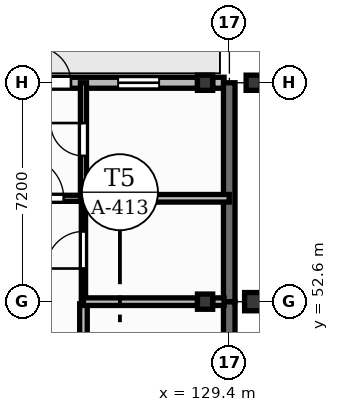
"""IFC4 building model, lengths in metres.
Left out: names, types, materials, properties, quantities, classifications, styles, units other than length and angle.
Written with IfcOpenShell. Run it as: python <this file> out.ifc"""

import sys

from ifc_helpers import new_model, si_unit, direction, frame, frame_2d, origin, origin_2d, place, context, subcontext, project, spatial, rectangle, extrude, element, fill, save


model = new_model("IFC4")
c1 = context("Model", 3, precision=1e-05, world=origin(), true_north=direction((0.0, 1.0)))
c2 = subcontext(c1, "Body", "Model", "MODEL_VIEW")
j1 = project(units=[si_unit("LENGTHUNIT", "METRE"), si_unit("PLANEANGLEUNIT", "RADIAN")], contexts=[c1])
p1 = place(None, origin())
s1 = spatial("IfcSite", under=j1, at=p1, CompositionType="ELEMENT")
p2 = place(p1, origin())
s2 = spatial("IfcBuilding", under=s1, at=p2, CompositionType="ELEMENT")
p3 = place(p2, origin())
s3 = spatial("IfcBuildingStorey", under=s2, at=p3, CompositionType="ELEMENT", Elevation=0.0)
for number, where, z_axis, x_axis in (
    (1, (128.6, 52.6, 0.0), (0.0, 0.0, 1.0), (1.0, 0.0, 0.0)),
    (2, (128.6, 59.8, 0.0), (0.0, 0.0, 1.0), (1.0, 0.0, 0.0)),
):
    element("IfcColumn", number, at=place(p3, frame(where, z_axis=z_axis, x_axis=x_axis)), inside=s3, PredefinedType="COLUMN", context=c2, shape_type="SweptSolid", body=[
        extrude(rectangle(XDim=0.5, YDim=0.5, at=origin_2d()), origin(), (0.0, 0.0, 1.0), 4.2),
    ])
p4 = place(p3, frame((130.2, 52.6, -0.4), z_axis=(0.0, 0.0, 1.0), x_axis=(1.0, 0.0, 0.0)))
e3 = element("IfcColumn", 3, at=p4, inside=s3, PredefinedType="COLUMN", context=c2, shape_type="SweptSolid", body=[
    extrude(rectangle(XDim=0.6, YDim=0.6, at=origin_2d()), origin(), (0.0, 0.0, 1.0), 4.5),
])
p5 = place(p3, frame((130.2, 59.8, -0.4), z_axis=(0.0, 0.0, 1.0), x_axis=(1.0, 0.0, 0.0)))
e4 = element("IfcColumn", 4, at=p5, inside=s3, PredefinedType="COLUMN", context=c2, shape_type="SweptSolid", body=[
    extrude(rectangle(XDim=0.5, YDim=0.5, at=origin_2d()), origin(), (0.0, 0.0, 1.0), 4.5),
])
p6 = place(p3, frame((129.395, 45.4, 0.0), z_axis=(0.0, 0.0, 1.0), x_axis=(0.0, 1.0, 0.0)))
e5 = element("IfcWall", 5, at=p6, inside=s3, PredefinedType="USERDEFINED", context=c2, shape_type="SweptSolid", body=[
    extrude(rectangle(XDim=7.2, YDim=0.38, at=frame_2d((3.6, 0.0))), origin(), (0.0, 0.0, 1.0), 4.2),
])
p7 = place(p3, frame((122.425, 59.8, 0.0), z_axis=(0.0, 0.0, 1.0), x_axis=(1.0, 0.0, 0.0)))
e6 = element("IfcWall", 6, at=p7, inside=s3, PredefinedType="SOLIDWALL", context=c2, shape_type="SweptSolid", body=[
    extrude(rectangle(XDim=5.925, YDim=0.36, at=frame_2d((2.962, 0.0))), origin(), (0.0, 0.0, 1.0), 3.68),
])
p8 = place(p7, frame((0.585, 0.0, 0.0)))
e7 = element("IfcOpeningElement", 7, at=p8, cuts=e6, PredefinedType="OPENING", context=c2, shape_type="SweptSolid", body=[
    extrude(rectangle(XDim=1.18, YDim=2.2, at=frame_2d((0.59, 1.1))), frame((0.0, 0.19, 0.0), z_axis=(0.0, -1.0, 0.0), x_axis=(1.0, 0.0, 0.0)), (0.0, 0.0, 1.0), 0.38),
])
p9 = place(p7, frame((3.315, 0.0, 1.0)))
e8 = element("IfcOpeningElement", 8, at=p9, cuts=e6, PredefinedType="OPENING", context=c2, shape_type="SweptSolid", body=[
    extrude(rectangle(XDim=1.35, YDim=2.2, at=frame_2d((0.675, 1.1))), frame((0.0, 0.19, 0.0), z_axis=(0.0, -1.0, 0.0), x_axis=(1.0, 0.0, 0.0)), (0.0, 0.0, 1.0), 0.38),
])
p10 = place(p3, frame((128.85, 59.8, 0.0), z_axis=(0.0, 0.0, 1.0), x_axis=(1.0, 0.0, 0.0)))
e9 = element("IfcWall", 9, at=p10, inside=s3, PredefinedType="SOLIDWALL", context=c2, shape_type="SweptSolid", body=[
    extrude(rectangle(XDim=0.375, YDim=0.36, at=frame_2d((0.188, 0.0))), origin(), (0.0, 0.0, 1.0), 4.2),
])
p11 = place(p3, frame((129.395, 52.6, 0.0), z_axis=(0.0, 0.0, 1.0), x_axis=(0.0, 1.0, 0.0)))
e10 = element("IfcWall", 10, at=p11, inside=s3, PredefinedType="USERDEFINED", context=c2, shape_type="SweptSolid", body=[
    extrude(rectangle(XDim=7.2, YDim=0.38, at=frame_2d((3.6, 0.0))), origin(), (0.0, 0.0, 1.0), 4.2),
])
p12 = place(p3, frame((121.94, 56.0, 0.0), z_axis=(0.0, 0.0, 1.0), x_axis=(1.0, 0.0, 0.0)))
e11 = element("IfcWall", 11, at=p12, inside=s3, PredefinedType="PARTITIONING", context=c2, shape_type="SweptSolid", body=[
    extrude(rectangle(XDim=2.66, YDim=0.2, at=frame_2d((1.33, 0.0))), origin(), (0.0, 0.0, 1.0), 4.18),
])
p13 = place(p12, frame((0.65, 0.0, 0.0)))
e12 = element("IfcOpeningElement", 12, at=p13, cuts=e11, PredefinedType="OPENING", context=c2, shape_type="SweptSolid", body=[
    extrude(rectangle(XDim=1.36, YDim=2.2, at=frame_2d((0.68, 1.1))), frame((0.0, 0.11, 0.0), z_axis=(0.0, -1.0, 0.0), x_axis=(1.0, 0.0, 0.0)), (0.0, 0.0, 1.0), 0.22),
])
p14 = place(p3, frame((124.6, 48.948, 0.0), z_axis=(0.0, 0.0, 1.0), x_axis=(0.0, 1.0, 0.0)))
e13 = element("IfcWall", 13, at=p14, inside=s3, PredefinedType="SOLIDWALL", context=c2, shape_type="SweptSolid", body=[
    extrude(rectangle(XDim=3.582, YDim=0.25, at=frame_2d((1.791, 0.0))), origin(), (0.0, 0.0, 1.0), 4.18),
])
p15 = place(p14, frame((1.251, 0.0, 0.0)))
e14 = element("IfcOpeningElement", 14, at=p15, cuts=e13, PredefinedType="OPENING", context=c2, shape_type="SweptSolid", body=[
    extrude(rectangle(XDim=1.08, YDim=2.15, at=frame_2d((0.54, 1.075))), frame((0.0, 0.135, 0.0), z_axis=(0.0, -1.0, 0.0), x_axis=(1.0, 0.0, 0.0)), (0.0, 0.0, 1.0), 0.27),
])
p16 = place(p3, frame((124.6, 52.67, 0.0), z_axis=(0.0, 0.0, 1.0), x_axis=(0.0, 1.0, 0.0)))
e15 = element("IfcWall", 15, at=p16, inside=s3, PredefinedType="PARTITIONING", context=c2, shape_type="SweptSolid", body=[
    extrude(rectangle(XDim=3.26, YDim=0.14, at=frame_2d((1.63, 0.0))), origin(), (0.0, 0.0, 1.0), 4.18),
])
p17 = place(p16, frame((1.02, 0.0, 0.0)))
e16 = element("IfcOpeningElement", 16, at=p17, cuts=e15, PredefinedType="OPENING", context=c2, shape_type="SweptSolid", body=[
    extrude(rectangle(XDim=1.22, YDim=2.1, at=frame_2d((0.61, 1.05))), frame((0.0, 0.08, 0.0), z_axis=(0.0, -1.0, 0.0), x_axis=(1.0, 0.0, 0.0)), (0.0, 0.0, 1.0), 0.16),
])
p18 = place(p3, frame((124.6, 52.6, 0.0), z_axis=(0.0, 0.0, 1.0), x_axis=(1.0, 0.0, 0.0)))
e17 = element("IfcWall", 17, at=p18, inside=s3, PredefinedType="SOLIDWALL", context=c2, shape_type="SweptSolid", body=[
    extrude(rectangle(XDim=3.75, YDim=0.25, at=frame_2d((1.875, 0.0))), origin(), (0.0, 0.0, 1.0), 3.5),
])
p19 = place(p3, frame((128.85, 52.6, 0.0), z_axis=(0.0, 0.0, 1.0), x_axis=(1.0, 0.0, 0.0)))
e18 = element("IfcWall", 18, at=p19, inside=s3, PredefinedType="SOLIDWALL", context=c2, shape_type="SweptSolid", body=[
    extrude(rectangle(XDim=0.375, YDim=0.25, at=frame_2d((0.188, 0.0))), origin(), (0.0, 0.0, 1.0), 4.18),
])
p20 = place(p3, frame((124.6, 56.07, 0.0), z_axis=(0.0, 0.0, 1.0), x_axis=(0.0, 1.0, 0.0)))
e19 = element("IfcWall", 19, at=p20, inside=s3, PredefinedType="PARTITIONING", context=c2, shape_type="SweptSolid", body=[
    extrude(rectangle(XDim=3.73, YDim=0.2, at=frame_2d((1.865, 0.0))), origin(), (0.0, 0.0, 1.0), 4.18),
])
p21 = place(p20, frame((1.325, 0.0, 0.0)))
e20 = element("IfcOpeningElement", 20, at=p21, cuts=e19, PredefinedType="OPENING", context=c2, shape_type="SweptSolid", body=[
    extrude(rectangle(XDim=1.08, YDim=2.15, at=frame_2d((0.54, 1.075))), frame((0.0, 0.11, 0.0), z_axis=(0.0, -1.0, 0.0), x_axis=(1.0, 0.0, 0.0)), (0.0, 0.0, 1.0), 0.22),
])
p22 = place(p3, frame((124.6, 56.0, 0.0), z_axis=(0.0, 0.0, 1.0), x_axis=(1.0, 0.0, 0.0)))
e21 = element("IfcWall", 21, at=p22, inside=s3, PredefinedType="SOLIDWALL", context=c2, shape_type="SweptSolid", body=[
    extrude(rectangle(XDim=4.795, YDim=0.25, at=frame_2d((2.397, 0.0))), origin(), (0.0, 0.0, 1.0), 4.18),
])
p23 = place(p8, origin())
e22 = element("IfcDoor", 22, at=p23, inside=s3, OperationType="SINGLE_SWING_LEFT", PredefinedType="DOOR", context=c2, shape_type="SweptSolid", body=[
    extrude(rectangle(XDim=1.18, YDim=2.2, at=frame_2d((0.59, 1.1))), frame((0.0, 0.025, 0.0), z_axis=(0.0, -1.0, 0.0), x_axis=(1.0, 0.0, 0.0)), (0.0, 0.0, 1.0), 0.05),
])
fill(e7, e22)
p24 = place(p9, origin())
e23 = element("IfcWindow", 23, at=p24, inside=s3, PartitioningType="SINGLE_PANEL", PredefinedType="WINDOW", context=c2, shape_type="SweptSolid", body=[
    extrude(rectangle(XDim=1.35, YDim=2.2, at=frame_2d((0.675, 1.1))), frame((0.0, 0.03, 0.0), z_axis=(0.0, -1.0, 0.0), x_axis=(1.0, 0.0, 0.0)), (0.0, 0.0, 1.0), 0.06),
])
fill(e8, e23)
p25 = place(p13, origin())
e24 = element("IfcDoor", 24, at=p25, inside=s3, OperationType="SINGLE_SWING_LEFT", PredefinedType="DOOR", context=c2, shape_type="SweptSolid", body=[
    extrude(rectangle(XDim=1.36, YDim=2.2, at=frame_2d((0.68, 1.1))), frame((0.0, 0.025, 0.0), z_axis=(0.0, -1.0, 0.0), x_axis=(1.0, 0.0, 0.0)), (0.0, 0.0, 1.0), 0.05),
])
fill(e12, e24)
p26 = place(p17, origin())
e25 = element("IfcDoor", 25, at=p26, inside=s3, OperationType="SINGLE_SWING_LEFT", PredefinedType="DOOR", context=c2, shape_type="SweptSolid", body=[
    extrude(rectangle(XDim=1.22, YDim=2.1, at=frame_2d((0.61, 1.05))), frame((0.0, 0.025, 0.0), z_axis=(0.0, -1.0, 0.0), x_axis=(1.0, 0.0, 0.0)), (0.0, 0.0, 1.0), 0.05),
])
fill(e16, e25)
p27 = place(p21, origin())
e26 = element("IfcDoor", 26, at=p27, inside=s3, OperationType="SINGLE_SWING_RIGHT", PredefinedType="DOOR", context=c2, shape_type="SweptSolid", body=[
    extrude(rectangle(XDim=1.08, YDim=2.15, at=frame_2d((0.54, 1.075))), frame((0.0, 0.025, 0.0), z_axis=(0.0, -1.0, 0.0), x_axis=(1.0, 0.0, 0.0)), (0.0, 0.0, 1.0), 0.05),
])
fill(e20, e26)
save(model, sys.argv[1])
